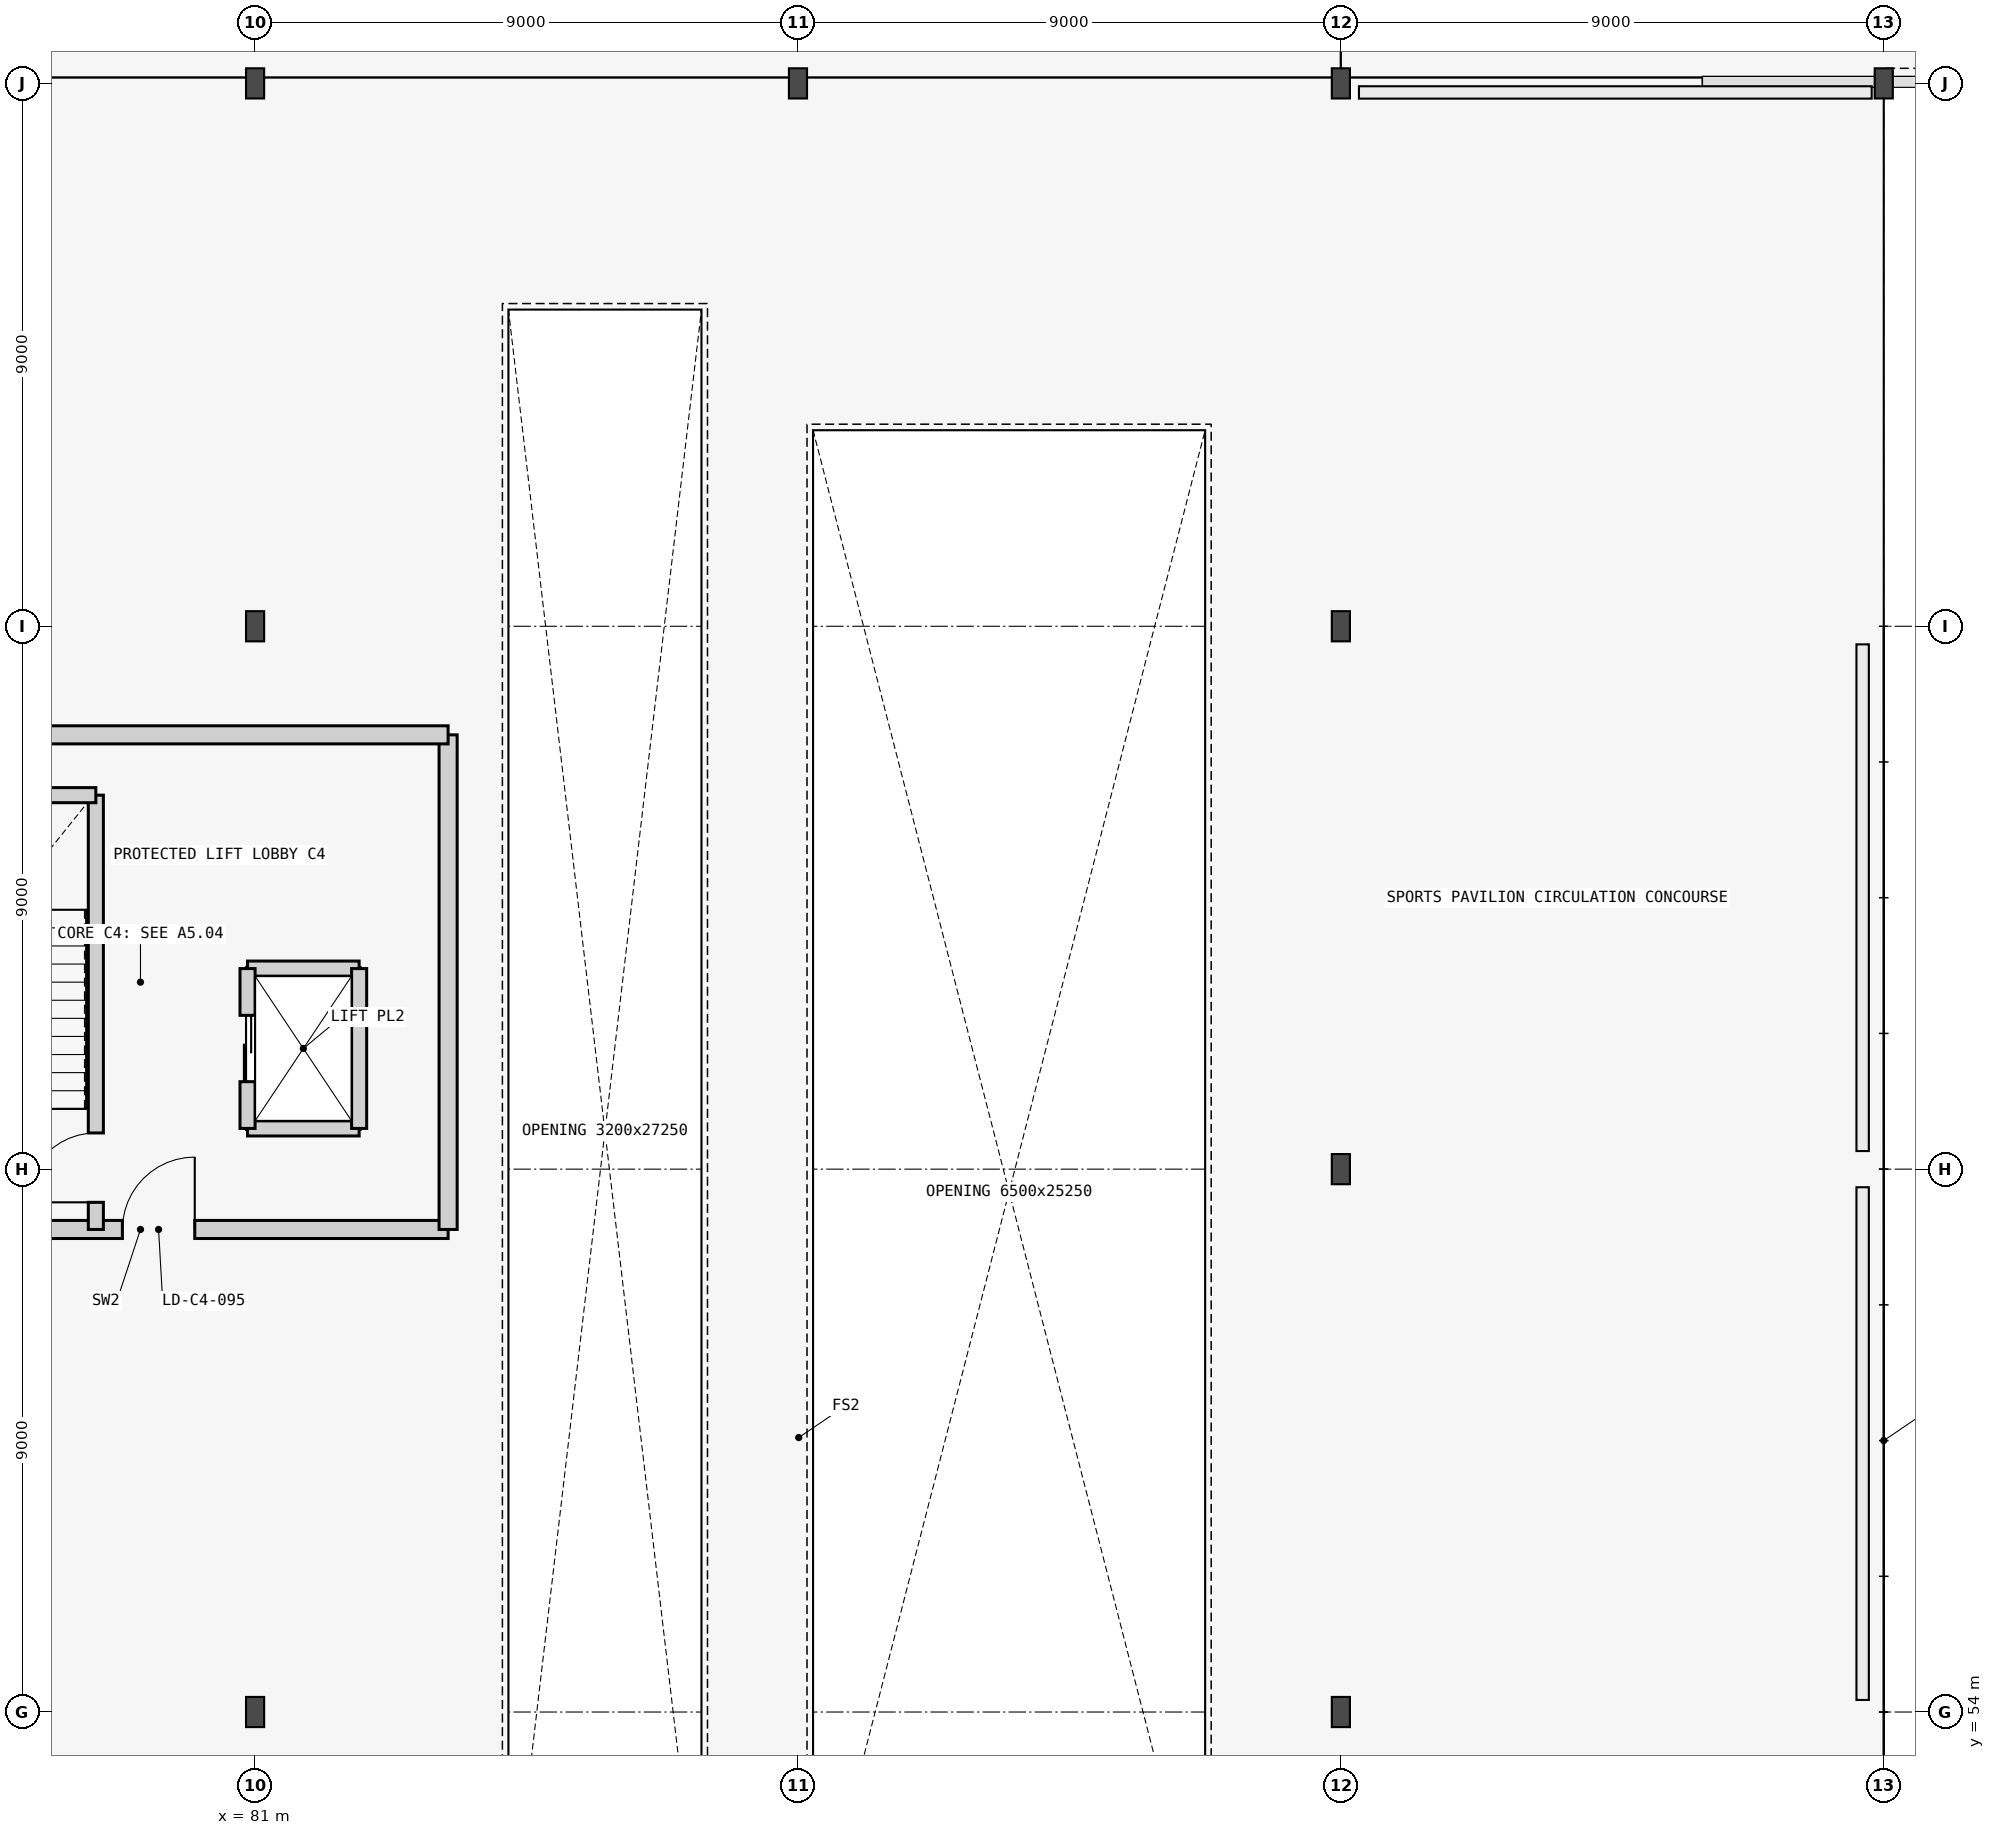
"""IFC4 building model, lengths in metres.
Left out: names, types, materials, properties, quantities, classifications, styles, units other than length and angle.
Written with IfcOpenShell. Run it as: python <this file> out.ifc"""

import sys

from ifc_helpers import new_model, si_unit, direction, frame, frame_2d, origin, origin_2d, place, context, subcontext, project, spatial, rectangle, i_section, extrude, element, fill, save


model = new_model("IFC4")
c1 = context("Model", 3, precision=1e-05, world=origin(), true_north=direction((0.0, 1.0)))
c2 = subcontext(c1, "Body", "Model", "MODEL_VIEW")
j1 = project(units=[si_unit("LENGTHUNIT", "METRE"), si_unit("PLANEANGLEUNIT", "RADIAN")], contexts=[c1])
p1 = place(None, origin())
s1 = spatial("IfcSite", under=j1, at=p1, CompositionType="ELEMENT")
p2 = place(p1, origin())
s2 = spatial("IfcBuilding", under=s1, at=p2, CompositionType="ELEMENT")
p3 = place(p2, frame((0.0, 0.0, 16.8)))
s3 = spatial("IfcBuildingStorey", under=s2, at=p3, CompositionType="ELEMENT", Elevation=16.8)
for number, where, z_axis, x_axis in (
    (1, (81.0, 54.0, 0.0), (0.0, 0.0, 1.0), (1.0, 0.0, 0.0)),
    (2, (81.0, 72.0, 0.0), (0.0, 0.0, 1.0), (1.0, 0.0, 0.0)),
    (3, (81.0, 81.0, 0.0), (0.0, 0.0, 1.0), (1.0, 0.0, 0.0)),
    (4, (99.0, 54.0, 0.0), (0.0, 0.0, 1.0), (1.0, 0.0, 0.0)),
    (5, (99.0, 63.0, 0.0), (0.0, 0.0, 1.0), (1.0, 0.0, 0.0)),
    (6, (99.0, 72.0, 0.0), (0.0, 0.0, 1.0), (1.0, 0.0, 0.0)),
    (7, (99.0, 81.0, 0.0), (0.0, 0.0, 1.0), (1.0, 0.0, 0.0)),
    (8, (108.0, 81.0, 0.0), (0.0, 0.0, 1.0), (1.0, 0.0, 0.0)),
    (9, (90.0, 81.0, 0.0), (0.0, 0.0, 1.0), (1.0, 0.0, 0.0)),
):
    element("IfcColumn", number, at=place(p3, frame(where, z_axis=z_axis, x_axis=x_axis)), inside=s3, PredefinedType="COLUMN", context=c2, shape_type="SweptSolid", body=[
        extrude(i_section(OverallWidth=0.3, OverallDepth=0.5, WebThickness=0.014, FlangeThickness=0.028, FilletRadius=0.027, at=origin_2d()), origin(), (0.0, 0.0, 1.0), 4.2),
    ])
p4 = place(p3, frame((107.65, 54.2, 0.0), z_axis=(0.0, 0.0, 1.0), x_axis=(0.0, 1.0, 0.0)))
e10 = element("IfcWall", 10, at=p4, inside=s3, PredefinedType="PARAPET", context=c2, shape_type="SweptSolid", body=[
    extrude(rectangle(XDim=8.5, YDim=0.205, at=frame_2d((4.25, 0.0))), origin(), (0.0, 0.0, 1.0), 0.95),
])
p5 = place(p3, frame((107.65, 63.3, 0.0), z_axis=(0.0, 0.0, 1.0), x_axis=(0.0, 1.0, 0.0)))
e11 = element("IfcWall", 11, at=p5, inside=s3, PredefinedType="PARAPET", context=c2, shape_type="SweptSolid", body=[
    extrude(rectangle(XDim=8.4, YDim=0.205, at=frame_2d((4.2, 0.0))), origin(), (0.0, 0.0, 1.0), 0.95),
])
p6 = place(p3, frame((99.3, 80.85, 0.0), z_axis=(0.0, 0.0, 1.0), x_axis=(1.0, 0.0, 0.0)))
e12 = element("IfcWall", 12, at=p6, inside=s3, PredefinedType="PARAPET", context=c2, shape_type="SweptSolid", body=[
    extrude(rectangle(XDim=8.5, YDim=0.205, at=frame_2d((4.25, 0.0))), origin(), (0.0, 0.0, 1.0), 0.95),
])
p7 = place(p3, frame((74.0, 62.0, 0.0), z_axis=(0.0, 0.0, 1.0), x_axis=(1.0, 0.0, 0.0)))
e13 = element("IfcWall", 13, at=p7, inside=s3, PredefinedType="SHEAR", context=c2, shape_type="SweptSolid", body=[
    extrude(rectangle(XDim=10.2, YDim=0.3, at=frame_2d((5.1, 0.0))), origin(), (0.0, 0.0, 1.0), 3.955),
])
p8 = place(p7, frame((4.8, 0.0, 0.0)))
e14 = element("IfcOpeningElement", 14, at=p8, cuts=e13, PredefinedType="OPENING", context=c2, shape_type="SweptSolid", body=[
    extrude(rectangle(XDim=1.2, YDim=2.15, at=frame_2d((0.6, 1.075))), frame((0.0, 0.16, 0.0), z_axis=(0.0, -1.0, 0.0), x_axis=(1.0, 0.0, 0.0)), (0.0, 0.0, 1.0), 0.32),
])
p9 = place(p3, frame((84.2, 62.0, 0.0), z_axis=(0.0, 0.0, 1.0), x_axis=(0.0, 1.0, 0.0)))
e15 = element("IfcWall", 15, at=p9, inside=s3, PredefinedType="SHEAR", context=c2, shape_type="SweptSolid", body=[
    extrude(rectangle(XDim=8.2, YDim=0.3, at=frame_2d((4.1, 0.0))), origin(), (0.0, 0.0, 1.0), 3.955),
])
p10 = place(p3, frame((84.2, 70.2, 0.0), z_axis=(0.0, 0.0, 1.0), x_axis=(-1.0, 0.0, 0.0)))
e16 = element("IfcWall", 16, at=p10, inside=s3, PredefinedType="SHEAR", context=c2, shape_type="SweptSolid", body=[
    extrude(rectangle(XDim=10.2, YDim=0.3, at=frame_2d((5.1, 0.0))), origin(), (0.0, 0.0, 1.0), 3.955),
])
p11 = place(p3, frame((78.36, 62.0, 0.0), z_axis=(0.0, 0.0, 1.0), x_axis=(0.0, 1.0, 0.0)))
e17 = element("IfcWall", 17, at=p11, inside=s3, PredefinedType="SHEAR", context=c2, shape_type="SweptSolid", body=[
    extrude(rectangle(XDim=7.2, YDim=0.25, at=frame_2d((3.6, 0.0))), origin(), (0.0, 0.0, 1.0), 3.955),
])
p12 = place(p11, frame((0.45, 0.0, 0.0)))
e18 = element("IfcOpeningElement", 18, at=p12, cuts=e17, PredefinedType="OPENING", context=c2, shape_type="SweptSolid", body=[
    extrude(rectangle(XDim=1.15, YDim=2.15, at=frame_2d((0.575, 1.075))), frame((0.0, 0.135, 0.0), z_axis=(0.0, -1.0, 0.0), x_axis=(1.0, 0.0, 0.0)), (0.0, 0.0, 1.0), 0.27),
])
p13 = place(p3, frame((74.0, 69.2, 0.0), z_axis=(0.0, 0.0, 1.0), x_axis=(1.0, 0.0, 0.0)))
e19 = element("IfcWall", 19, at=p13, inside=s3, PredefinedType="SHEAR", context=c2, shape_type="SweptSolid", body=[
    extrude(rectangle(XDim=4.36, YDim=0.25, at=frame_2d((2.18, 0.0))), origin(), (0.0, 0.0, 1.0), 3.955),
])
for number, where, z_axis, x_axis in (
    (20, (80.875, 63.675, 0.0), (0.0, 0.0, 1.0), (1.0, 0.0, 0.0)),
    (21, (80.875, 66.325, 0.0), (0.0, 0.0, 1.0), (1.0, 0.0, 0.0)),
):
    element("IfcWall", number, at=place(p3, frame(where, z_axis=z_axis, x_axis=x_axis)), inside=s3, PredefinedType="SHEAR", context=c2, shape_type="SweptSolid", body=[
        extrude(rectangle(XDim=1.85, YDim=0.25, at=frame_2d((0.925, 0.0))), origin(), (0.0, 0.0, 1.0), 3.955),
    ])
p14 = place(p3, frame((82.725, 63.675, 0.0), z_axis=(0.0, 0.0, 1.0), x_axis=(0.0, 1.0, 0.0)))
e22 = element("IfcWall", 22, at=p14, inside=s3, PredefinedType="SHEAR", context=c2, shape_type="SweptSolid", body=[
    extrude(rectangle(XDim=2.65, YDim=0.25, at=frame_2d((1.325, 0.0))), origin(), (0.0, 0.0, 1.0), 3.955),
])
p15 = place(p3, frame((80.875, 63.675, 0.0), z_axis=(0.0, 0.0, 1.0), x_axis=(0.0, 1.0, 0.0)))
e23 = element("IfcWall", 23, at=p15, inside=s3, PredefinedType="SHEAR", context=c2, shape_type="SweptSolid", body=[
    extrude(rectangle(XDim=2.65, YDim=0.25, at=frame_2d((1.325, 0.0))), origin(), (0.0, 0.0, 1.0), 3.955),
])
p16 = place(p15, frame((0.775, 0.0, 0.0)))
e24 = element("IfcOpeningElement", 24, at=p16, cuts=e23, PredefinedType="OPENING", context=c2, shape_type="SweptSolid", body=[
    extrude(rectangle(XDim=1.1, YDim=2.15, at=frame_2d((0.55, 1.075))), frame((0.0, 0.135, 0.0), z_axis=(0.0, -1.0, 0.0), x_axis=(1.0, 0.0, 0.0)), (0.0, 0.0, 1.0), 0.27),
])
p17 = place(p12, origin())
e25 = element("IfcDoor", 25, at=p17, inside=s3, OperationType="SINGLE_SWING_LEFT", PredefinedType="DOOR", context=c2, shape_type="SweptSolid", body=[
    extrude(rectangle(XDim=1.15, YDim=2.15, at=frame_2d((0.575, 1.075))), frame((0.0, 0.025, 0.0), z_axis=(0.0, -1.0, 0.0), x_axis=(1.0, 0.0, 0.0)), (0.0, 0.0, 1.0), 0.05),
])
fill(e18, e25)
p18 = place(p8, origin())
e26 = element("IfcDoor", 26, at=p18, inside=s3, OperationType="SINGLE_SWING_RIGHT", PredefinedType="DOOR", context=c2, shape_type="SweptSolid", body=[
    extrude(rectangle(XDim=1.2, YDim=2.15, at=frame_2d((0.6, 1.075))), frame((0.0, 0.025, 0.0), z_axis=(0.0, -1.0, 0.0), x_axis=(1.0, 0.0, 0.0)), (0.0, 0.0, 1.0), 0.05),
])
fill(e14, e26)
p19 = place(p16, origin())
e27 = element("IfcDoor", 27, at=p19, inside=s3, OperationType="DOUBLE_DOOR_SLIDING", PredefinedType="USERDEFINED", context=c2, shape_type="SweptSolid", body=[
    extrude(rectangle(XDim=1.1, YDim=2.15, at=frame_2d((0.55, 1.075))), frame((0.0, 0.025, 0.0), z_axis=(0.0, -1.0, 0.0), x_axis=(1.0, 0.0, 0.0)), (0.0, 0.0, 1.0), 0.05),
])
fill(e24, e27)
save(model, sys.argv[1])
